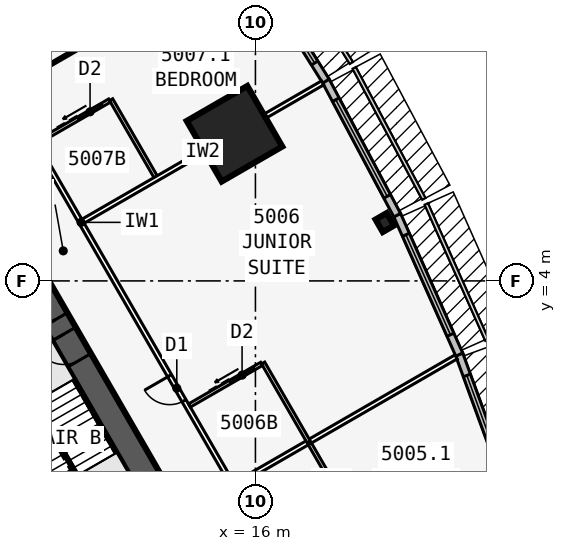
"""IFC4 building model, lengths in metres.
Left out: names, types, materials, properties, quantities, classifications, styles, units other than length and angle.
Written with IfcOpenShell. Run it as: python <this file> out.ifc"""

import sys

from ifc_helpers import new_model, si_unit, direction, frame, frame_2d, origin, origin_2d, place, context, subcontext, project, spatial, rectangle, i_section, extrude, element, fill, save


model = new_model("IFC4")
c1 = context("Model", 3, precision=1e-05, world=origin(), true_north=direction((0.0, 1.0)))
c2 = subcontext(c1, "Body", "Model", "MODEL_VIEW")
j1 = project(units=[si_unit("LENGTHUNIT", "METRE"), si_unit("PLANEANGLEUNIT", "RADIAN")], contexts=[c1])
p1 = place(None, origin())
s1 = spatial("IfcSite", under=j1, at=p1, CompositionType="ELEMENT")
p2 = place(p1, origin())
s2 = spatial("IfcBuilding", under=s1, at=p2, CompositionType="ELEMENT")
p3 = place(p2, frame((0.0, 0.0, 186.1)))
s3 = spatial("IfcBuildingStorey", under=s2, at=p3, CompositionType="ELEMENT", Elevation=186.1)
p4 = place(p3, frame((16.5, -9.526, 0.0), z_axis=(0.0, 0.0, 1.0), x_axis=(-0.499999749417, 0.866025548458, 0.0)))
e1 = element("IfcWall", 1, at=p4, inside=s3, PredefinedType="SHEAR", context=c2, shape_type="SweptSolid", body=[
    extrude(rectangle(XDim=33.0, YDim=0.9, at=frame_2d((16.5, 0.0))), origin(), (0.0, 0.0, 1.0), 3.4),
])
p5 = place(p4, frame((14.15, 0.0, 0.0)))
e2 = element("IfcOpeningElement", 2, at=p5, cuts=e1, PredefinedType="OPENING", context=c2, shape_type="SweptSolid", body=[
    extrude(rectangle(XDim=1.8, YDim=2.13, at=frame_2d((0.9, 1.065))), frame((0.0, 0.46, 0.0), z_axis=(0.0, -1.0, 0.0), x_axis=(1.0, 0.0, 0.0)), (0.0, 0.0, 1.0), 0.92),
])
p6 = place(p4, frame((12.6, 0.0, 0.0)))
e3 = element("IfcOpeningElement", 3, at=p6, cuts=e1, PredefinedType="OPENING", context=c2, shape_type="SweptSolid", body=[
    extrude(rectangle(XDim=1.0, YDim=2.13, at=frame_2d((0.5, 1.065))), frame((0.0, 0.46, 0.0), z_axis=(0.0, -1.0, 0.0), x_axis=(1.0, 0.0, 0.0)), (0.0, 0.0, 1.0), 0.92),
])
p7 = place(p3, frame((10.245, -5.843, 0.0), z_axis=(0.0, 0.0, 1.0), x_axis=(-0.499993009313, 0.866029439822, 0.0)))
e4 = element("IfcWall", 4, at=p7, inside=s3, PredefinedType="SOLIDWALL", context=c2, shape_type="SweptSolid", body=[
    extrude(rectangle(XDim=7.733, YDim=0.25, at=frame_2d((3.866, 0.0))), origin(), (0.0, 0.0, 1.0), 3.15),
])
p8 = place(p3, frame((20.254, 5.92, 0.0), z_axis=(0.0, 0.0, 1.0), x_axis=(0.866025403784, 0.5, 0.0)))
e5 = element("IfcColumn", 5, at=p8, inside=s3, PredefinedType="COLUMN", context=c2, shape_type="SweptSolid", body=[
    extrude(i_section(OverallWidth=0.424, OverallDepth=0.475, WebThickness=0.048, FlangeThickness=0.077, at=origin_2d()), origin(), (0.0, 0.0, 1.0), 3.4),
])
p9 = place(p3, frame((15.312, 8.84, 0.0), z_axis=(0.0, 0.0, 1.0), x_axis=(0.866025403784, 0.5, 0.0)))
e6 = element("IfcColumn", 6, at=p9, inside=s3, PredefinedType="COLUMN", context=c2, shape_type="SweptSolid", body=[
    extrude(rectangle(XDim=2.3, YDim=2.3, at=origin_2d()), origin(), (0.0, 0.0, 1.0), 3.4),
])
p10 = place(p3, frame((24.444, -3.183, 0.0), z_axis=(0.0, 0.0, 1.0), x_axis=(-0.343225593282, 0.939252996863, 0.0)))
e7 = element("IfcWall", 7, at=p10, inside=s3, PredefinedType="STANDARD", context=c2, shape_type="SweptSolid", body=[
    extrude(rectangle(XDim=5.076, YDim=0.25, at=frame_2d((2.538, 0.0))), origin(), (0.0, 0.0, 1.0), 3.15),
])
p11 = place(p10, frame((0.738, 0.0, 0.45)))
e8 = element("IfcOpeningElement", 8, at=p11, cuts=e7, PredefinedType="OPENING", context=c2, shape_type="SweptSolid", body=[
    extrude(rectangle(XDim=3.6, YDim=2.4, at=frame_2d((1.8, 1.2))), frame((0.0, 0.135, 0.0), z_axis=(0.0, -1.0, 0.0), x_axis=(1.0, 0.0, 0.0)), (0.0, 0.0, 1.0), 0.27),
])
p12 = place(p3, frame((22.705, 1.576, 0.0), z_axis=(0.0, 0.0, 1.0), x_axis=(-0.406832200364, 0.913502906808, 0.0)))
e9 = element("IfcWall", 9, at=p12, inside=s3, PredefinedType="STANDARD", context=c2, shape_type="SweptSolid", body=[
    extrude(rectangle(XDim=5.028, YDim=0.25, at=frame_2d((2.514, 0.0))), origin(), (0.0, 0.0, 1.0), 3.15),
])
p13 = place(p12, frame((0.714, 0.0, 0.45)))
e10 = element("IfcOpeningElement", 10, at=p13, cuts=e9, PredefinedType="OPENING", context=c2, shape_type="SweptSolid", body=[
    extrude(rectangle(XDim=3.6, YDim=2.4, at=frame_2d((1.8, 1.2))), frame((0.0, 0.135, 0.0), z_axis=(0.0, -1.0, 0.0), x_axis=(1.0, 0.0, 0.0)), (0.0, 0.0, 1.0), 0.27),
])
p14 = place(p3, frame((20.663, 6.161, 0.0), z_axis=(0.0, 0.0, 1.0), x_axis=(-0.469404966864, 0.882982999317, 0.0)))
e11 = element("IfcWall", 11, at=p14, inside=s3, PredefinedType="STANDARD", context=c2, shape_type="SweptSolid", body=[
    extrude(rectangle(XDim=5.003, YDim=0.25, at=frame_2d((2.501, 0.0))), origin(), (0.0, 0.0, 1.0), 3.15),
])
p15 = place(p14, frame((0.701, 0.0, 0.45)))
e12 = element("IfcOpeningElement", 12, at=p15, cuts=e11, PredefinedType="OPENING", context=c2, shape_type="SweptSolid", body=[
    extrude(rectangle(XDim=3.6, YDim=2.4, at=frame_2d((1.8, 1.2))), frame((0.0, 0.135, 0.0), z_axis=(0.0, -1.0, 0.0), x_axis=(1.0, 0.0, 0.0)), (0.0, 0.0, 1.0), 0.27),
])
p16 = place(p3, frame((18.319, 10.571, 0.0), z_axis=(0.0, 0.0, 1.0), x_axis=(-0.529990167382, 0.84800378683, 0.0)))
e13 = element("IfcWall", 13, at=p16, inside=s3, PredefinedType="STANDARD", context=c2, shape_type="SweptSolid", body=[
    extrude(rectangle(XDim=5.003, YDim=0.25, at=frame_2d((2.501, 0.0))), origin(), (0.0, 0.0, 1.0), 3.15),
])
p17 = place(p16, frame((0.701, 0.0, 0.45)))
e14 = element("IfcOpeningElement", 14, at=p17, cuts=e13, PredefinedType="OPENING", context=c2, shape_type="SweptSolid", body=[
    extrude(rectangle(XDim=3.6, YDim=2.4, at=frame_2d((1.8, 1.2))), frame((0.0, 0.135, 0.0), z_axis=(0.0, -1.0, 0.0), x_axis=(1.0, 0.0, 0.0)), (0.0, 0.0, 1.0), 0.27),
])
p18 = place(p3, frame((20.027, -10.985, 0.0), z_axis=(0.0, 0.0, 1.0), x_axis=(-0.500001677587, 0.866024435227, 0.0)))
e15 = element("IfcWall", 15, at=p18, inside=s3, PredefinedType="PARTITIONING", context=c2, shape_type="SweptSolid", body=[
    extrude(rectangle(XDim=39.054, YDim=0.15, at=frame_2d((19.527, 0.0))), origin(), (0.0, 0.0, 1.0), 3.15),
])
p19 = place(p18, frame((1.558, 0.0, 0.0)))
e16 = element("IfcOpeningElement", 16, at=p19, cuts=e15, PredefinedType="OPENING", context=c2, shape_type="SweptSolid", body=[
    extrude(rectangle(XDim=0.95, YDim=2.13, at=frame_2d((0.475, 1.065))), frame((0.0, 0.085, 0.0), z_axis=(0.0, -1.0, 0.0), x_axis=(1.0, 0.0, 0.0)), (0.0, 0.0, 1.0), 0.17),
])
p20 = place(p18, frame((12.752, 0.0, 0.0)))
e17 = element("IfcOpeningElement", 17, at=p20, cuts=e15, PredefinedType="OPENING", context=c2, shape_type="SweptSolid", body=[
    extrude(rectangle(XDim=0.95, YDim=2.13, at=frame_2d((0.475, 1.065))), frame((0.0, 0.085, 0.0), z_axis=(0.0, -1.0, 0.0), x_axis=(1.0, 0.0, 0.0)), (0.0, 0.0, 1.0), 0.17),
])
p21 = place(p18, frame((26.552, 0.0, 0.0)))
e18 = element("IfcOpeningElement", 18, at=p21, cuts=e15, PredefinedType="OPENING", context=c2, shape_type="SweptSolid", body=[
    extrude(rectangle(XDim=0.95, YDim=2.13, at=frame_2d((0.475, 1.065))), frame((0.0, 0.085, 0.0), z_axis=(0.0, -1.0, 0.0), x_axis=(1.0, 0.0, 0.0)), (0.0, 0.0, 1.0), 0.17),
])
p22 = place(p18, frame((37.752, 0.0, 0.0)))
e19 = element("IfcOpeningElement", 19, at=p22, cuts=e15, PredefinedType="OPENING", context=c2, shape_type="SweptSolid", body=[
    extrude(rectangle(XDim=0.95, YDim=2.13, at=frame_2d((0.475, 1.065))), frame((0.0, 0.085, 0.0), z_axis=(0.0, -1.0, 0.0), x_axis=(1.0, 0.0, 0.0)), (0.0, 0.0, 1.0), 0.17),
])
p23 = place(p3, frame((15.329, -2.697, 0.0), z_axis=(0.0, 0.0, 1.0), x_axis=(0.866024316602, 0.50000188305, 0.0)))
e20 = element("IfcWall", 20, at=p23, inside=s3, PredefinedType="PARTITIONING", context=c2, shape_type="SweptSolid", body=[
    extrude(rectangle(XDim=8.395, YDim=0.15, at=frame_2d((4.198, 0.0))), origin(), (0.0, 0.0, 1.0), 2.108),
])
p24 = place(p3, frame((10.329, 5.963, 0.0), z_axis=(0.0, 0.0, 1.0), x_axis=(0.866025170687, 0.500000403736, 0.0)))
e21 = element("IfcWall", 21, at=p24, inside=s3, PredefinedType="PARTITIONING", context=c2, shape_type="SweptSolid", body=[
    extrude(rectangle(XDim=9.099, YDim=0.15, at=frame_2d((4.549, 0.0))), origin(), (0.0, 0.0, 1.0), 2.108),
])
p25 = place(p3, frame((7.829, 10.293, 0.0), z_axis=(0.0, 0.0, 1.0), x_axis=(0.866027015393, 0.499997208602, 0.0)))
e22 = element("IfcWall", 22, at=p25, inside=s3, PredefinedType="PARTITIONING", context=c2, shape_type="SweptSolid", body=[
    extrude(rectangle(XDim=8.922, YDim=0.1, at=frame_2d((4.461, 0.0))), origin(), (0.0, 0.0, 1.0), 2.05),
])
p26 = place(p25, frame((0.45, 0.0, 0.0)))
e23 = element("IfcOpeningElement", 23, at=p26, cuts=e22, PredefinedType="OPENING", context=c2, shape_type="SweptSolid", body=[
    extrude(rectangle(XDim=0.9, YDim=2.032, at=frame_2d((0.45, 1.016))), frame((0.0, 0.06, 0.0), z_axis=(0.0, -1.0, 0.0), x_axis=(1.0, 0.0, 0.0)), (0.0, 0.0, 1.0), 0.12),
])
for number, where, z_axis, x_axis in (
    (24, (19.253, -3.895, 0.0), (0.0, 0.0, 1.0), (-0.5, 0.866, 0.0)),
    (25, (17.753, -1.297, 0.0), (0.0, 0.0, 1.0), (-0.5, 0.866, 0.0)),
):
    element("IfcWall", number, at=place(p3, frame(where, z_axis=z_axis, x_axis=x_axis)), inside=s3, PredefinedType="PLUMBINGWALL", context=c2, shape_type="SweptSolid", body=[
        extrude(rectangle(XDim=3.0, YDim=0.12, at=frame_2d((1.5, 0.0))), origin(), (0.0, 0.0, 1.0), 3.15),
    ])
p27 = place(p3, frame((13.829, -0.099, 0.0), z_axis=(0.0, 0.0, 1.0), x_axis=(0.865997131366, 0.500048966069, 0.0)))
e26 = element("IfcWall", 26, at=p27, inside=s3, PredefinedType="PLUMBINGWALL", context=c2, shape_type="SweptSolid", body=[
    extrude(rectangle(XDim=2.74, YDim=0.12, at=frame_2d((1.37, 0.0))), origin(), (0.0, 0.0, 1.0), 3.15),
])
p28 = place(p27, frame((1.55, 0.0, 0.0)))
e27 = element("IfcOpeningElement", 27, at=p28, cuts=e26, PredefinedType="OPENING", context=c2, shape_type="SweptSolid", body=[
    extrude(rectangle(XDim=0.9, YDim=2.13, at=frame_2d((0.45, 1.065))), frame((0.0, 0.07, 0.0), z_axis=(0.0, -1.0, 0.0), x_axis=(1.0, 0.0, 0.0)), (0.0, 0.0, 1.0), 0.14),
])
p29 = place(p3, frame((12.753, 7.363, 0.0), z_axis=(0.0, 0.0, 1.0), x_axis=(-0.499990139034, 0.866031096941, 0.0)))
e28 = element("IfcWall", 28, at=p29, inside=s3, PredefinedType="PLUMBINGWALL", context=c2, shape_type="SweptSolid", body=[
    extrude(rectangle(XDim=3.0, YDim=0.12, at=frame_2d((1.5, 0.0))), origin(), (0.0, 0.0, 1.0), 3.15),
])
p30 = place(p3, frame((8.829, 8.561, 0.0), z_axis=(0.0, 0.0, 1.0), x_axis=(0.866035715982, 0.499982138324, 0.0)))
e29 = element("IfcWall", 29, at=p30, inside=s3, PredefinedType="PLUMBINGWALL", context=c2, shape_type="SweptSolid", body=[
    extrude(rectangle(XDim=2.74, YDim=0.12, at=frame_2d((1.37, 0.0))), origin(), (0.0, 0.0, 1.0), 3.15),
])
p31 = place(p30, frame((1.55, 0.0, 0.0)))
e30 = element("IfcOpeningElement", 30, at=p31, cuts=e29, PredefinedType="OPENING", context=c2, shape_type="SweptSolid", body=[
    extrude(rectangle(XDim=0.9, YDim=2.13, at=frame_2d((0.45, 1.065))), frame((0.0, 0.07, 0.0), z_axis=(0.0, -1.0, 0.0), x_axis=(1.0, 0.0, 0.0)), (0.0, 0.0, 1.0), 0.14),
])
p32 = place(p3, frame((10.135, -2.401, 0.0), z_axis=(0.0, 0.0, 1.0), x_axis=(-0.499992232847, 0.866029888106, 0.0)))
e31 = element("IfcWall", 31, at=p32, inside=s3, PredefinedType="SOLIDWALL", context=c2, shape_type="SweptSolid", body=[
    extrude(rectangle(XDim=2.794, YDim=0.1, at=frame_2d((1.397, 0.0))), origin(), (0.0, 0.0, 1.0), 3.4),
])
p33 = place(p11, origin())
e32 = element("IfcWindow", 32, at=p33, inside=s3, PartitioningType="SINGLE_PANEL", PredefinedType="WINDOW", context=c2, shape_type="SweptSolid", body=[
    extrude(rectangle(XDim=3.6, YDim=2.4, at=frame_2d((1.8, 1.2))), frame((0.0, 0.03, 0.0), z_axis=(0.0, -1.0, 0.0), x_axis=(1.0, 0.0, 0.0)), (0.0, 0.0, 1.0), 0.06),
])
fill(e8, e32)
p34 = place(p13, origin())
e33 = element("IfcWindow", 33, at=p34, inside=s3, PartitioningType="SINGLE_PANEL", PredefinedType="WINDOW", context=c2, shape_type="SweptSolid", body=[
    extrude(rectangle(XDim=3.6, YDim=2.4, at=frame_2d((1.8, 1.2))), frame((0.0, 0.03, 0.0), z_axis=(0.0, -1.0, 0.0), x_axis=(1.0, 0.0, 0.0)), (0.0, 0.0, 1.0), 0.06),
])
fill(e10, e33)
p35 = place(p15, origin())
e34 = element("IfcWindow", 34, at=p35, inside=s3, PartitioningType="SINGLE_PANEL", PredefinedType="WINDOW", context=c2, shape_type="SweptSolid", body=[
    extrude(rectangle(XDim=3.6, YDim=2.4, at=frame_2d((1.8, 1.2))), frame((0.0, 0.03, 0.0), z_axis=(0.0, -1.0, 0.0), x_axis=(1.0, 0.0, 0.0)), (0.0, 0.0, 1.0), 0.06),
])
fill(e12, e34)
p36 = place(p17, origin())
e35 = element("IfcWindow", 35, at=p36, inside=s3, PartitioningType="SINGLE_PANEL", PredefinedType="WINDOW", context=c2, shape_type="SweptSolid", body=[
    extrude(rectangle(XDim=3.6, YDim=2.4, at=frame_2d((1.8, 1.2))), frame((0.0, 0.03, 0.0), z_axis=(0.0, -1.0, 0.0), x_axis=(1.0, 0.0, 0.0)), (0.0, 0.0, 1.0), 0.06),
])
fill(e14, e35)
p37 = place(p28, origin())
e36 = element("IfcDoor", 36, at=p37, inside=s3, OperationType="SLIDING_TO_LEFT", PredefinedType="DOOR", context=c2, shape_type="SweptSolid", body=[
    extrude(rectangle(XDim=0.9, YDim=2.13, at=frame_2d((0.45, 1.065))), frame((0.0, 0.025, 0.0), z_axis=(0.0, -1.0, 0.0), x_axis=(1.0, 0.0, 0.0)), (0.0, 0.0, 1.0), 0.05),
])
fill(e27, e36)
p38 = place(p20, origin())
e37 = element("IfcDoor", 37, at=p38, inside=s3, OperationType="SINGLE_SWING_RIGHT", PredefinedType="DOOR", context=c2, shape_type="SweptSolid", body=[
    extrude(rectangle(XDim=0.95, YDim=2.13, at=frame_2d((0.475, 1.065))), frame((0.0, 0.025, 0.0), z_axis=(0.0, -1.0, 0.0), x_axis=(1.0, 0.0, 0.0)), (0.0, 0.0, 1.0), 0.05),
])
fill(e17, e37)
p39 = place(p31, origin())
e38 = element("IfcDoor", 38, at=p39, inside=s3, OperationType="SLIDING_TO_LEFT", PredefinedType="DOOR", context=c2, shape_type="SweptSolid", body=[
    extrude(rectangle(XDim=0.9, YDim=2.13, at=frame_2d((0.45, 1.065))), frame((0.0, 0.025, 0.0), z_axis=(0.0, -1.0, 0.0), x_axis=(1.0, 0.0, 0.0)), (0.0, 0.0, 1.0), 0.05),
])
fill(e30, e38)
p40 = place(p5, origin())
e39 = element("IfcDoor", 39, at=p40, inside=s3, OperationType="DOUBLE_DOOR_SINGLE_SWING", PredefinedType="DOOR", context=c2, shape_type="SweptSolid", body=[
    extrude(rectangle(XDim=1.8, YDim=2.13, at=frame_2d((0.9, 1.065))), frame((0.0, 0.025, 0.0), z_axis=(0.0, -1.0, 0.0), x_axis=(1.0, 0.0, 0.0)), (0.0, 0.0, 1.0), 0.05),
])
fill(e2, e39)
p41 = place(p6, origin())
e40 = element("IfcDoor", 40, at=p41, inside=s3, OperationType="SINGLE_SWING_RIGHT", PredefinedType="DOOR", context=c2, shape_type="SweptSolid", body=[
    extrude(rectangle(XDim=1.0, YDim=2.13, at=frame_2d((0.5, 1.065))), frame((0.0, 0.025, 0.0), z_axis=(0.0, -1.0, 0.0), x_axis=(1.0, 0.0, 0.0)), (0.0, 0.0, 1.0), 0.05),
])
fill(e3, e40)
save(model, sys.argv[1])
